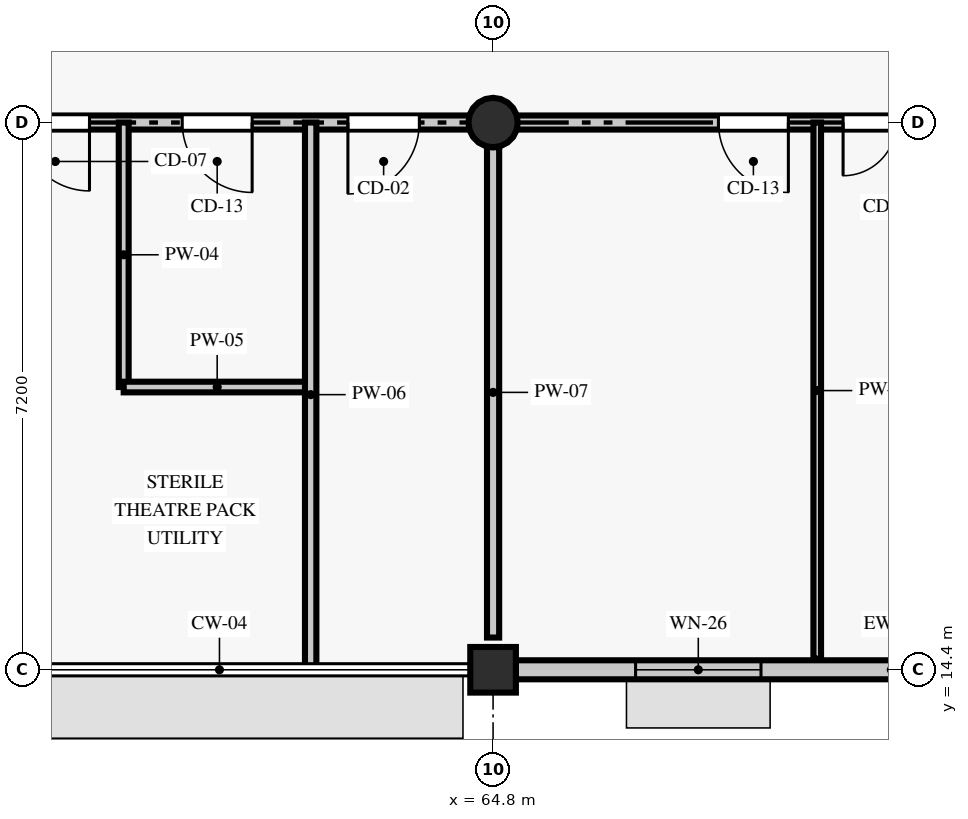
"""IFC4 building model, lengths in metres.
Left out: names, types, materials, properties, quantities, classifications, styles, units other than length and angle.
Written with IfcOpenShell. Run it as: python <this file> out.ifc"""

import sys

from ifc_helpers import new_model, si_unit, direction, frame, frame_2d, origin, origin_2d, place, context, subcontext, project, spatial, rectangle, circle, extrude, element, fill, save


model = new_model("IFC4")
c1 = context("Model", 3, precision=1e-05, world=origin(), true_north=direction((0.0, 1.0)))
c2 = subcontext(c1, "Body", "Model", "MODEL_VIEW")
j1 = project(units=[si_unit("LENGTHUNIT", "METRE"), si_unit("PLANEANGLEUNIT", "RADIAN")], contexts=[c1])
p1 = place(None, origin())
s1 = spatial("IfcSite", under=j1, at=p1, CompositionType="ELEMENT")
p2 = place(p1, origin())
s2 = spatial("IfcBuilding", under=s1, at=p2, CompositionType="ELEMENT")
p3 = place(p2, frame((0.0, 0.0, 9.6)))
s3 = spatial("IfcBuildingStorey", under=s2, at=p3, CompositionType="ELEMENT", Elevation=9.6)
p4 = place(p3, frame((64.8, 14.4, 0.0), z_axis=(0.0, 0.0, 1.0), x_axis=(1.0, 0.0, 0.0)))
e1 = element("IfcColumn", 1, at=p4, inside=s3, PredefinedType="COLUMN", context=c2, shape_type="SweptSolid", body=[
    extrude(rectangle(XDim=0.6, YDim=0.6, at=origin_2d()), origin(), (0.0, 0.0, 1.0), 3.9),
])
p5 = place(p3, frame((64.8, 21.6, 0.0), z_axis=(0.0, 0.0, 1.0), x_axis=(1.0, 0.0, 0.0)))
e2 = element("IfcColumn", 2, at=p5, inside=s3, PredefinedType="COLUMN", context=c2, shape_type="SweptSolid", body=[
    extrude(circle(Radius=0.325, at=origin_2d()), origin(), (0.0, 0.0, 1.0), 3.9),
])
p6 = place(p3, frame((65.096, 14.4, 0.0), z_axis=(0.0, 0.0, 1.0), x_axis=(1.0, 0.0, 0.0)))
e3 = element("IfcWall", 3, at=p6, inside=s3, PredefinedType="STANDARD", context=c2, shape_type="SweptSolid", body=[
    extrude(rectangle(XDim=6.608, YDim=0.25, at=frame_2d((3.304, 0.0))), origin(), (0.0, 0.0, 1.0), 3.25),
])
p7 = place(p6, frame((1.579, 0.0, 0.9)))
e4 = element("IfcOpeningElement", 4, at=p7, cuts=e3, PredefinedType="OPENING", context=c2, shape_type="SweptSolid", body=[
    extrude(rectangle(XDim=1.65, YDim=1.54, at=frame_2d((0.825, 0.77))), frame((0.0, 0.135, 0.0), z_axis=(0.0, -1.0, 0.0), x_axis=(1.0, 0.0, 0.0)), (0.0, 0.0, 1.0), 0.27),
])
p8 = place(p3, frame((50.824, 21.6, 0.0), z_axis=(0.0, 0.0, 1.0), x_axis=(1.0, 0.0, 0.0)))
e5 = element("IfcWall", 5, at=p8, inside=s3, PredefinedType="PARTITIONING", context=c2, shape_type="SweptSolid", body=[
    extrude(rectangle(XDim=35.151, YDim=0.185, at=frame_2d((17.576, 0.0))), origin(), (0.0, 0.0, 1.0), 3.05),
])
p9 = place(p8, frame((2.548, 0.0, 0.0)))
e6 = element("IfcOpeningElement", 6, at=p9, cuts=e5, PredefinedType="OPENING", context=c2, shape_type="SweptSolid", body=[
    extrude(rectangle(XDim=1.34, YDim=2.14, at=frame_2d((0.67, 1.07))), frame((0.0, 0.103, 0.0), z_axis=(0.0, -1.0, 0.0), x_axis=(1.0, 0.0, 0.0)), (0.0, 0.0, 1.0), 0.205),
])
p10 = place(p8, frame((7.766, 0.0, 0.0)))
e7 = element("IfcOpeningElement", 7, at=p10, cuts=e5, PredefinedType="OPENING", context=c2, shape_type="SweptSolid", body=[
    extrude(rectangle(XDim=0.9, YDim=2.13, at=frame_2d((0.45, 1.065))), frame((0.0, 0.103, 0.0), z_axis=(0.0, -1.0, 0.0), x_axis=(1.0, 0.0, 0.0)), (0.0, 0.0, 1.0), 0.205),
])
p11 = place(p8, frame((9.886, 0.0, 0.0)))
e8 = element("IfcOpeningElement", 8, at=p11, cuts=e5, PredefinedType="OPENING", context=c2, shape_type="SweptSolid", body=[
    extrude(rectangle(XDim=0.92, YDim=2.18, at=frame_2d((0.46, 1.09))), frame((0.0, 0.103, 0.0), z_axis=(0.0, -1.0, 0.0), x_axis=(1.0, 0.0, 0.0)), (0.0, 0.0, 1.0), 0.205),
])
p12 = place(p8, frame((12.066, 0.0, 0.0)))
e9 = element("IfcOpeningElement", 9, at=p12, cuts=e5, PredefinedType="OPENING", context=c2, shape_type="SweptSolid", body=[
    extrude(rectangle(XDim=0.94, YDim=2.08, at=frame_2d((0.47, 1.04))), frame((0.0, 0.103, 0.0), z_axis=(0.0, -1.0, 0.0), x_axis=(1.0, 0.0, 0.0)), (0.0, 0.0, 1.0), 0.205),
])
p13 = place(p8, frame((16.941, 0.0, 0.0)))
e10 = element("IfcOpeningElement", 10, at=p13, cuts=e5, PredefinedType="OPENING", context=c2, shape_type="SweptSolid", body=[
    extrude(rectangle(XDim=0.92, YDim=2.18, at=frame_2d((0.46, 1.09))), frame((0.0, 0.103, 0.0), z_axis=(0.0, -1.0, 0.0), x_axis=(1.0, 0.0, 0.0)), (0.0, 0.0, 1.0), 0.205),
])
p14 = place(p8, frame((18.581, 0.0, 0.0)))
e11 = element("IfcOpeningElement", 11, at=p14, cuts=e5, PredefinedType="OPENING", context=c2, shape_type="SweptSolid", body=[
    extrude(rectangle(XDim=1.4, YDim=2.16, at=frame_2d((0.7, 1.08))), frame((0.0, 0.103, 0.0), z_axis=(0.0, -1.0, 0.0), x_axis=(1.0, 0.0, 0.0)), (0.0, 0.0, 1.0), 0.205),
])
p15 = place(p8, frame((23.85, 0.0, 0.0)))
e12 = element("IfcOpeningElement", 12, at=p15, cuts=e5, PredefinedType="OPENING", context=c2, shape_type="SweptSolid", body=[
    extrude(rectangle(XDim=1.46, YDim=2.18, at=frame_2d((0.73, 1.09))), frame((0.0, 0.103, 0.0), z_axis=(0.0, -1.0, 0.0), x_axis=(1.0, 0.0, 0.0)), (0.0, 0.0, 1.0), 0.205),
])
p16 = place(p8, frame((31.486, 0.0, 0.0)))
e13 = element("IfcOpeningElement", 13, at=p16, cuts=e5, PredefinedType="OPENING", context=c2, shape_type="SweptSolid", body=[
    extrude(rectangle(XDim=0.97, YDim=2.18, at=frame_2d((0.485, 1.09))), frame((0.0, 0.103, 0.0), z_axis=(0.0, -1.0, 0.0), x_axis=(1.0, 0.0, 0.0)), (0.0, 0.0, 1.0), 0.205),
])
p17 = place(p3, frame((59.94, 18.12, 0.0), z_axis=(0.0, 0.0, 1.0), x_axis=(0.0, 1.0, 0.0)))
e14 = element("IfcWall", 14, at=p17, inside=s3, PredefinedType="PARTITIONING", context=c2, shape_type="SweptSolid", body=[
    extrude(rectangle(XDim=3.48, YDim=0.13, at=frame_2d((1.74, 0.0))), origin(), (0.0, 0.0, 1.0), 3.05),
])
p18 = place(p3, frame((59.94, 18.12, 0.0), z_axis=(0.0, 0.0, 1.0), x_axis=(1.0, 0.0, 0.0)))
e15 = element("IfcWall", 15, at=p18, inside=s3, PredefinedType="PARTITIONING", context=c2, shape_type="SweptSolid", body=[
    extrude(rectangle(XDim=2.46, YDim=0.14, at=frame_2d((1.23, 0.0))), origin(), (0.0, 0.0, 1.0), 3.4),
])
p19 = place(p3, frame((62.4, 14.44, 0.0), z_axis=(0.0, 0.0, 1.0), x_axis=(0.0, 1.0, 0.0)))
e16 = element("IfcWall", 16, at=p19, inside=s3, PredefinedType="PARTITIONING", context=c2, shape_type="SweptSolid", body=[
    extrude(rectangle(XDim=7.16, YDim=0.15, at=frame_2d((3.58, 0.0))), origin(), (0.0, 0.0, 1.0), 3.05),
])
p20 = place(p3, frame((64.8, 14.824, 0.0), z_axis=(0.0, 0.0, 1.0), x_axis=(0.0, 1.0, 0.0)))
e17 = element("IfcWall", 17, at=p20, inside=s3, PredefinedType="PARTITIONING", context=c2, shape_type="SweptSolid", body=[
    extrude(rectangle(XDim=6.451, YDim=0.16, at=frame_2d((3.225, 0.0))), origin(), (0.0, 0.0, 1.0), 3.3),
])
p21 = place(p3, frame((69.065, 14.547, 0.0), z_axis=(0.0, 0.0, 1.0), x_axis=(0.0, 1.0, 0.0)))
e18 = element("IfcWall", 18, at=p21, inside=s3, PredefinedType="PARTITIONING", context=c2, shape_type="SweptSolid", body=[
    extrude(rectangle(XDim=7.053, YDim=0.1, at=frame_2d((3.526, 0.0))), origin(), (0.0, 0.0, 1.0), 3.05),
])
p22 = place(p7, origin())
e19 = element("IfcWindow", 19, at=p22, inside=s3, PartitioningType="SINGLE_PANEL", PredefinedType="WINDOW", context=c2, shape_type="SweptSolid", body=[
    extrude(rectangle(XDim=1.65, YDim=1.54, at=frame_2d((0.825, 0.77))), frame((0.0, 0.03, 0.0), z_axis=(0.0, -1.0, 0.0), x_axis=(1.0, 0.0, 0.0)), (0.0, 0.0, 1.0), 0.06),
])
fill(e4, e19)
p23 = place(p10, frame((0.9, 0.0, 0.0), z_axis=(0.0, 0.0, 1.0), x_axis=(-1.0, 0.0, 0.0)))
e20 = element("IfcDoor", 20, at=p23, inside=s3, OperationType="SINGLE_SWING_LEFT", PredefinedType="DOOR", context=c2, shape_type="SweptSolid", body=[
    extrude(rectangle(XDim=0.9, YDim=2.13, at=frame_2d((0.45, 1.065))), frame((0.0, 0.025, 0.0), z_axis=(0.0, -1.0, 0.0), x_axis=(1.0, 0.0, 0.0)), (0.0, 0.0, 1.0), 0.05),
])
fill(e7, e20)
p24 = place(p11, frame((0.92, 0.0, 0.0), z_axis=(0.0, 0.0, 1.0), x_axis=(-1.0, 0.0, 0.0)))
e21 = element("IfcDoor", 21, at=p24, inside=s3, OperationType="SINGLE_SWING_LEFT", PredefinedType="DOOR", context=c2, shape_type="SweptSolid", body=[
    extrude(rectangle(XDim=0.92, YDim=2.18, at=frame_2d((0.46, 1.09))), frame((0.0, 0.025, 0.0), z_axis=(0.0, -1.0, 0.0), x_axis=(1.0, 0.0, 0.0)), (0.0, 0.0, 1.0), 0.05),
])
fill(e8, e21)
p25 = place(p12, frame((0.94, 0.0, 0.0), z_axis=(0.0, 0.0, 1.0), x_axis=(-1.0, 0.0, 0.0)))
e22 = element("IfcDoor", 22, at=p25, inside=s3, OperationType="SINGLE_SWING_RIGHT", PredefinedType="DOOR", context=c2, shape_type="SweptSolid", body=[
    extrude(rectangle(XDim=0.94, YDim=2.08, at=frame_2d((0.47, 1.04))), frame((0.0, 0.025, 0.0), z_axis=(0.0, -1.0, 0.0), x_axis=(1.0, 0.0, 0.0)), (0.0, 0.0, 1.0), 0.05),
])
fill(e9, e22)
p26 = place(p13, frame((0.92, 0.0, 0.0), z_axis=(0.0, 0.0, 1.0), x_axis=(-1.0, 0.0, 0.0)))
e23 = element("IfcDoor", 23, at=p26, inside=s3, OperationType="SINGLE_SWING_LEFT", PredefinedType="DOOR", context=c2, shape_type="SweptSolid", body=[
    extrude(rectangle(XDim=0.92, YDim=2.18, at=frame_2d((0.46, 1.09))), frame((0.0, 0.025, 0.0), z_axis=(0.0, -1.0, 0.0), x_axis=(1.0, 0.0, 0.0)), (0.0, 0.0, 1.0), 0.05),
])
fill(e10, e23)
p27 = place(p14, frame((1.4, 0.0, 0.0), z_axis=(0.0, 0.0, 1.0), x_axis=(-1.0, 0.0, 0.0)))
e24 = element("IfcDoor", 24, at=p27, inside=s3, OperationType="DOUBLE_DOOR_SINGLE_SWING", PredefinedType="DOOR", context=c2, shape_type="SweptSolid", body=[
    extrude(rectangle(XDim=1.4, YDim=2.16, at=frame_2d((0.7, 1.08))), frame((0.0, 0.025, 0.0), z_axis=(0.0, -1.0, 0.0), x_axis=(1.0, 0.0, 0.0)), (0.0, 0.0, 1.0), 0.05),
])
fill(e11, e24)
save(model, sys.argv[1])
